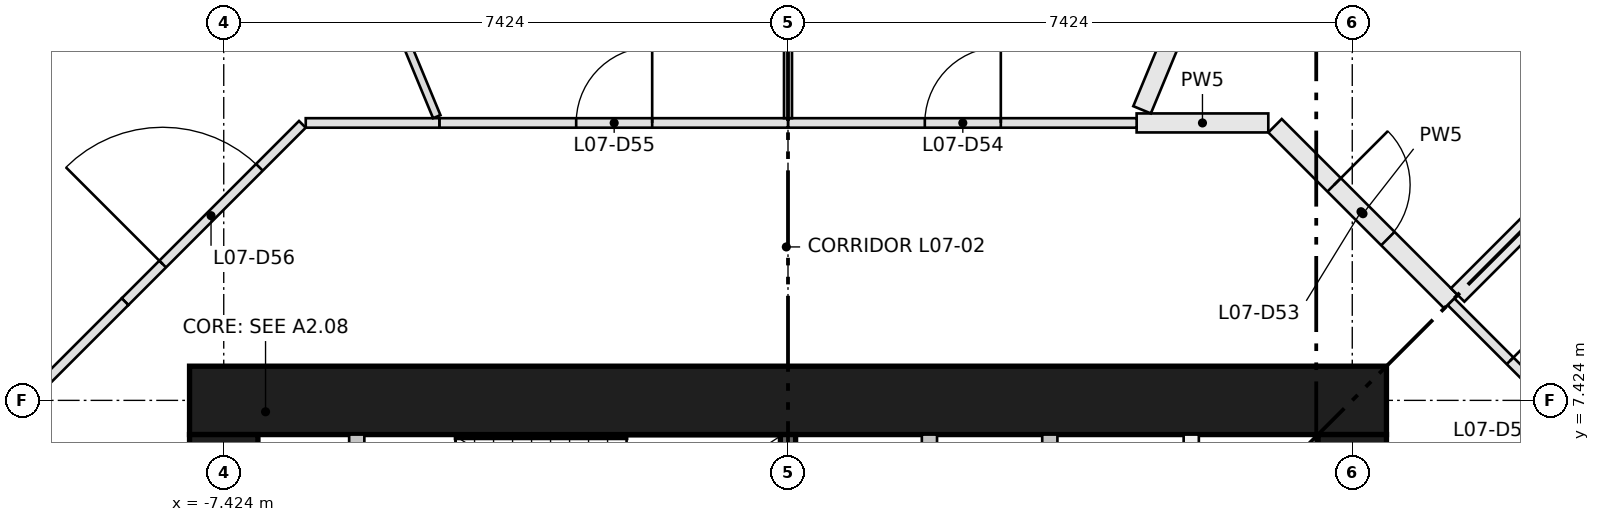
"""IFC4 building model, lengths in metres.
Left out: names, types, materials, properties, quantities, classifications, styles, units other than length and angle.
Written with IfcOpenShell. Run it as: python <this file> out.ifc"""

import sys

from ifc_helpers import new_model, si_unit, direction, frame, frame_2d, origin, place, context, subcontext, project, spatial, rectangle, extrude, element, fill, save


model = new_model("IFC4")
c1 = context("Model", 3, precision=1e-05, world=origin(), true_north=direction((0.0, 1.0)))
c2 = subcontext(c1, "Body", "Model", "MODEL_VIEW")
j1 = project(units=[si_unit("LENGTHUNIT", "METRE"), si_unit("PLANEANGLEUNIT", "RADIAN")], contexts=[c1])
p1 = place(None, origin())
s1 = spatial("IfcSite", under=j1, at=p1, CompositionType="ELEMENT")
p2 = place(p1, origin())
s2 = spatial("IfcBuilding", under=s1, at=p2, CompositionType="ELEMENT")
p3 = place(p2, frame((0.0, 0.0, 29.85)))
s3 = spatial("IfcBuildingStorey", under=s2, at=p3, CompositionType="ELEMENT", Elevation=29.85)
p4 = place(p3, frame((-7.874, 7.424, 0.0), z_axis=(0.0, 0.0, 1.0), x_axis=(1.0, 0.0, 0.0)))
e1 = element("IfcWall", 1, at=p4, inside=s3, PredefinedType="SHEAR", context=c2, shape_type="SweptSolid", body=[
    extrude(rectangle(XDim=15.748, YDim=0.9, at=frame_2d((7.874, 0.0))), origin(), (0.0, 0.0, 1.0), 3.65),
])
p5 = place(p3, frame((-7.424, -6.974, 0.0), z_axis=(0.0, 0.0, 1.0), x_axis=(0.0, 1.0, 0.0)))
e2 = element("IfcWall", 2, at=p5, inside=s3, PredefinedType="SHEAR", context=c2, shape_type="SweptSolid", body=[
    extrude(rectangle(XDim=13.948, YDim=0.9, at=frame_2d((6.974, 0.0))), origin(), (0.0, 0.0, 1.0), 3.65),
])
p6 = place(p5, frame((6.474, 0.0, 0.0)))
e3 = element("IfcOpeningElement", 3, at=p6, cuts=e2, PredefinedType="OPENING", context=c2, shape_type="SweptSolid", body=[
    extrude(rectangle(XDim=1.0, YDim=2.1, at=frame_2d((0.5, 1.05))), frame((0.0, 0.46, 0.0), z_axis=(0.0, -1.0, 0.0), x_axis=(1.0, 0.0, 0.0)), (0.0, 0.0, 1.0), 0.92),
])
p7 = place(p5, frame((3.35, 0.0, 0.0)))
e4 = element("IfcOpeningElement", 4, at=p7, cuts=e2, PredefinedType="OPENING", context=c2, shape_type="SweptSolid", body=[
    extrude(rectangle(XDim=1.8, YDim=2.1, at=frame_2d((0.9, 1.05))), frame((0.0, 0.46, 0.0), z_axis=(0.0, -1.0, 0.0), x_axis=(1.0, 0.0, 0.0)), (0.0, 0.0, 1.0), 0.92),
])
p8 = place(p5, frame((8.799, 0.0, 0.0)))
e5 = element("IfcOpeningElement", 5, at=p8, cuts=e2, PredefinedType="OPENING", context=c2, shape_type="SweptSolid", body=[
    extrude(rectangle(XDim=1.8, YDim=2.1, at=frame_2d((0.9, 1.05))), frame((0.0, 0.46, 0.0), z_axis=(0.0, -1.0, 0.0), x_axis=(1.0, 0.0, 0.0)), (0.0, 0.0, 1.0), 0.92),
])
p9 = place(p5, frame((11.974, 0.0, 0.0)))
e6 = element("IfcOpeningElement", 6, at=p9, cuts=e2, PredefinedType="OPENING", context=c2, shape_type="SweptSolid", body=[
    extrude(rectangle(XDim=1.0, YDim=2.1, at=frame_2d((0.5, 1.05))), frame((0.0, 0.46, 0.0), z_axis=(0.0, -1.0, 0.0), x_axis=(1.0, 0.0, 0.0)), (0.0, 0.0, 1.0), 0.92),
])
p10 = place(p3, frame((7.424, -6.974, 0.0), z_axis=(0.0, 0.0, 1.0), x_axis=(0.0, 1.0, 0.0)))
e7 = element("IfcWall", 7, at=p10, inside=s3, PredefinedType="SHEAR", context=c2, shape_type="SweptSolid", body=[
    extrude(rectangle(XDim=13.948, YDim=0.9, at=frame_2d((6.974, 0.0))), origin(), (0.0, 0.0, 1.0), 3.65),
])
p11 = place(p10, frame((6.474, 0.0, 0.0)))
e8 = element("IfcOpeningElement", 8, at=p11, cuts=e7, PredefinedType="OPENING", context=c2, shape_type="SweptSolid", body=[
    extrude(rectangle(XDim=1.0, YDim=2.1, at=frame_2d((0.5, 1.05))), frame((0.0, 0.46, 0.0), z_axis=(0.0, -1.0, 0.0), x_axis=(1.0, 0.0, 0.0)), (0.0, 0.0, 1.0), 0.92),
])
p12 = place(p10, frame((3.35, 0.0, 0.0)))
e9 = element("IfcOpeningElement", 9, at=p12, cuts=e7, PredefinedType="OPENING", context=c2, shape_type="SweptSolid", body=[
    extrude(rectangle(XDim=1.8, YDim=2.1, at=frame_2d((0.9, 1.05))), frame((0.0, 0.46, 0.0), z_axis=(0.0, -1.0, 0.0), x_axis=(1.0, 0.0, 0.0)), (0.0, 0.0, 1.0), 0.92),
])
p13 = place(p10, frame((8.799, 0.0, 0.0)))
e10 = element("IfcOpeningElement", 10, at=p13, cuts=e7, PredefinedType="OPENING", context=c2, shape_type="SweptSolid", body=[
    extrude(rectangle(XDim=1.8, YDim=2.1, at=frame_2d((0.9, 1.05))), frame((0.0, 0.46, 0.0), z_axis=(0.0, -1.0, 0.0), x_axis=(1.0, 0.0, 0.0)), (0.0, 0.0, 1.0), 0.92),
])
p14 = place(p3, frame((0.0, 5.574, 0.0), z_axis=(0.0, 0.0, 1.0), x_axis=(0.0, 1.0, 0.0)))
e11 = element("IfcWall", 11, at=p14, inside=s3, PredefinedType="SHEAR", context=c2, shape_type="SweptSolid", body=[
    extrude(rectangle(XDim=1.4, YDim=0.2, at=frame_2d((0.7, 0.0))), origin(), (0.0, 0.0, 1.0), 3.3),
])
for number, where, z_axis, x_axis in (
    (12, (1.861, 4.174, 0.0), (0.0, 0.0, 1.0), (0.0, 1.0, 0.0)),
    (13, (3.445, 4.174, 0.0), (0.0, 0.0, 1.0), (0.0, 1.0, 0.0)),
    (14, (5.305, 4.174, 0.0), (0.0, 0.0, 1.0), (0.0, 1.0, 0.0)),
):
    element("IfcWall", number, at=place(p3, frame(where, z_axis=z_axis, x_axis=x_axis)), inside=s3, PredefinedType="PARTITIONING", context=c2, shape_type="SweptSolid", body=[
        extrude(rectangle(XDim=2.8, YDim=0.2, at=frame_2d((1.4, 0.0))), origin(), (0.0, 0.0, 1.0), 3.3),
    ])
p15 = place(p3, frame((-5.674, 4.174, 0.0), z_axis=(0.0, 0.0, 1.0), x_axis=(0.0, 1.0, 0.0)))
e15 = element("IfcWall", 15, at=p15, inside=s3, PredefinedType="PARTITIONING", context=c2, shape_type="SweptSolid", body=[
    extrude(rectangle(XDim=2.8, YDim=0.2, at=frame_2d((1.4, 0.0))), origin(), (0.0, 0.0, 1.0), 3.3),
])
p16 = place(p15, frame((0.125, 0.0, 0.0)))
e16 = element("IfcOpeningElement", 16, at=p16, cuts=e15, PredefinedType="OPENING", context=c2, shape_type="SweptSolid", body=[
    extrude(rectangle(XDim=0.95, YDim=2.1, at=frame_2d((0.475, 1.05))), frame((0.0, 0.11, 0.0), z_axis=(0.0, -1.0, 0.0), x_axis=(1.0, 0.0, 0.0)), (0.0, 0.0, 1.0), 0.22),
])
p17 = place(p15, frame((1.725, 0.0, 0.0)))
e17 = element("IfcOpeningElement", 17, at=p17, cuts=e15, PredefinedType="OPENING", context=c2, shape_type="SweptSolid", body=[
    extrude(rectangle(XDim=0.95, YDim=2.1, at=frame_2d((0.475, 1.05))), frame((0.0, 0.11, 0.0), z_axis=(0.0, -1.0, 0.0), x_axis=(1.0, 0.0, 0.0)), (0.0, 0.0, 1.0), 0.22),
])
p18 = place(p3, frame((8.722, 8.722, 0.0), z_axis=(0.0, 0.0, 1.0), x_axis=(0.707143776336, -0.707069784102, 0.0)))
e18 = element("IfcWall", 18, at=p18, inside=s3, PredefinedType="PARTITIONING", context=c2, shape_type="SweptSolid", body=[
    extrude(rectangle(XDim=3.3, YDim=0.125, at=frame_2d((1.65, 0.0))), origin(), (0.0, 0.0, 1.0), 3.3),
])
p19 = place(p18, frame((1.1, 0.0, 0.0)))
e19 = element("IfcOpeningElement", 19, at=p19, cuts=e18, PredefinedType="OPENING", context=c2, shape_type="SweptSolid", body=[
    extrude(rectangle(XDim=1.0, YDim=2.1, at=frame_2d((0.5, 1.05))), frame((0.0, 0.073, 0.0), z_axis=(0.0, -1.0, 0.0), x_axis=(1.0, 0.0, 0.0)), (0.0, 0.0, 1.0), 0.145),
])
p20 = place(p3, frame((4.587, 11.074, 0.0), z_axis=(0.0, 0.0, 1.0), x_axis=(1.0, 0.0, 0.0)))
e20 = element("IfcWall", 20, at=p20, inside=s3, PredefinedType="PARTITIONING", context=c2, shape_type="SweptSolid", body=[
    extrude(rectangle(XDim=1.732, YDim=0.25, at=frame_2d((0.866, 0.0))), origin(), (0.0, 0.0, 1.0), 3.3),
])
p21 = place(p3, frame((6.408, 11.037, 0.0), z_axis=(0.0, 0.0, 1.0), x_axis=(0.707069491442, -0.707144068965, 0.0)))
e21 = element("IfcWall", 21, at=p21, inside=s3, PredefinedType="PARTITIONING", context=c2, shape_type="SweptSolid", body=[
    extrude(rectangle(XDim=3.274, YDim=0.25, at=frame_2d((1.637, 0.0))), origin(), (0.0, 0.0, 1.0), 3.3),
])
p22 = place(p21, frame((1.1, 0.0, 0.0)))
e22 = element("IfcOpeningElement", 22, at=p22, cuts=e21, PredefinedType="OPENING", context=c2, shape_type="SweptSolid", body=[
    extrude(rectangle(XDim=1.0, YDim=2.1, at=frame_2d((0.5, 1.05))), frame((0.0, 0.135, 0.0), z_axis=(0.0, -1.0, 0.0), x_axis=(1.0, 0.0, 0.0)), (0.0, 0.0, 1.0), 0.27),
])
p23 = place(p3, frame((0.0, 11.074, 0.0), z_axis=(0.0, 0.0, 1.0), x_axis=(1.0, 0.0, 0.0)))
e23 = element("IfcWall", 23, at=p23, inside=s3, PredefinedType="PARTITIONING", context=c2, shape_type="SweptSolid", body=[
    extrude(rectangle(XDim=4.587, YDim=0.125, at=frame_2d((2.293, 0.0))), origin(), (0.0, 0.0, 1.0), 3.3),
])
p24 = place(p23, frame((1.8, 0.0, 0.0)))
e24 = element("IfcOpeningElement", 24, at=p24, cuts=e23, PredefinedType="OPENING", context=c2, shape_type="SweptSolid", body=[
    extrude(rectangle(XDim=1.0, YDim=2.1, at=frame_2d((0.5, 1.05))), frame((0.0, 0.073, 0.0), z_axis=(0.0, -1.0, 0.0), x_axis=(1.0, 0.0, 0.0)), (0.0, 0.0, 1.0), 0.145),
])
p25 = place(p3, frame((-4.587, 11.074, 0.0), z_axis=(0.0, 0.0, 1.0), x_axis=(1.0, 0.0, 0.0)))
e25 = element("IfcWall", 25, at=p25, inside=s3, PredefinedType="PARTITIONING", context=c2, shape_type="SweptSolid", body=[
    extrude(rectangle(XDim=4.587, YDim=0.125, at=frame_2d((2.293, 0.0))), origin(), (0.0, 0.0, 1.0), 3.3),
])
p26 = place(p25, frame((1.8, 0.0, 0.0)))
e26 = element("IfcOpeningElement", 26, at=p26, cuts=e25, PredefinedType="OPENING", context=c2, shape_type="SweptSolid", body=[
    extrude(rectangle(XDim=1.0, YDim=2.1, at=frame_2d((0.5, 1.05))), frame((0.0, 0.073, 0.0), z_axis=(0.0, -1.0, 0.0), x_axis=(1.0, 0.0, 0.0)), (0.0, 0.0, 1.0), 0.145),
])
p27 = place(p3, frame((-8.722, 8.722, 0.0), z_axis=(0.0, 0.0, 1.0), x_axis=(0.707069784102, 0.707143776336, 0.0)))
e27 = element("IfcWall", 27, at=p27, inside=s3, PredefinedType="PARTITIONING", context=c2, shape_type="SweptSolid", body=[
    extrude(rectangle(XDim=3.3, YDim=0.125, at=frame_2d((1.65, 0.0))), origin(), (0.0, 0.0, 1.0), 3.3),
])
p28 = place(p27, frame((0.7, 0.0, 0.0)))
e28 = element("IfcOpeningElement", 28, at=p28, cuts=e27, PredefinedType="OPENING", context=c2, shape_type="SweptSolid", body=[
    extrude(rectangle(XDim=1.8, YDim=2.1, at=frame_2d((0.9, 1.05))), frame((0.0, 0.073, 0.0), z_axis=(0.0, -1.0, 0.0), x_axis=(1.0, 0.0, 0.0)), (0.0, 0.0, 1.0), 0.145),
])
p29 = place(p3, frame((-6.345, 11.074, 0.0), z_axis=(0.0, 0.0, 1.0), x_axis=(1.0, 0.0, 0.0)))
e29 = element("IfcWall", 29, at=p29, inside=s3, PredefinedType="PARTITIONING", context=c2, shape_type="SweptSolid", body=[
    extrude(rectangle(XDim=1.758, YDim=0.125, at=frame_2d((0.879, 0.0))), origin(), (0.0, 0.0, 1.0), 3.3),
])
p30 = place(p3, frame((-11.056, 6.389, 0.0), z_axis=(0.0, 0.0, 1.0), x_axis=(0.707143776336, 0.707069784102, 0.0)))
e30 = element("IfcWall", 30, at=p30, inside=s3, PredefinedType="PARTITIONING", context=c2, shape_type="SweptSolid", body=[
    extrude(rectangle(XDim=3.3, YDim=0.125, at=frame_2d((1.65, 0.0))), origin(), (0.0, 0.0, 1.0), 3.3),
])
p31 = place(p3, frame((13.131, 13.131, 0.0), z_axis=(0.0, 0.0, 1.0), x_axis=(-0.707106781187, -0.707106781187, 0.0)))
e31 = element("IfcWall", 31, at=p31, inside=s3, PredefinedType="PARTITIONING", context=c2, shape_type="SweptSolid", body=[
    extrude(rectangle(XDim=6.11, YDim=0.25, at=frame_2d((3.055, 0.0))), origin(), (0.0, 0.0, 1.0), 3.3),
])
p32 = place(p3, frame((4.659, 11.247, 0.0), z_axis=(0.0, 0.0, 1.0), x_axis=(0.382693858119, 0.923875213954, 0.0)))
e32 = element("IfcWall", 32, at=p32, inside=s3, PredefinedType="PARTITIONING", context=c2, shape_type="SweptSolid", body=[
    extrude(rectangle(XDim=2.626, YDim=0.25, at=frame_2d((1.313, 0.0))), origin(), (0.0, 0.0, 1.0), 3.3),
])
p33 = place(p3, frame((0.0, 11.136, 0.0), z_axis=(0.0, 0.0, 1.0), x_axis=(0.0, 1.0, 0.0)))
e33 = element("IfcWall", 33, at=p33, inside=s3, PredefinedType="PARTITIONING", context=c2, shape_type="SweptSolid", body=[
    extrude(rectangle(XDim=3.607, YDim=0.105, at=frame_2d((1.804, 0.0))), origin(), (0.0, 0.0, 1.0), 3.3),
])
p34 = place(p3, frame((-4.621, 11.156, 0.0), z_axis=(0.0, 0.0, 1.0), x_axis=(-0.382750161953, 0.923851889388, 0.0)))
e34 = element("IfcWall", 34, at=p34, inside=s3, PredefinedType="PARTITIONING", context=c2, shape_type="SweptSolid", body=[
    extrude(rectangle(XDim=2.724, YDim=0.105, at=frame_2d((1.362, 0.0))), origin(), (0.0, 0.0, 1.0), 3.3),
])
p35 = place(p19, origin())
e35 = element("IfcDoor", 35, at=p35, inside=s3, OperationType="SINGLE_SWING_LEFT", PredefinedType="DOOR", context=c2, shape_type="SweptSolid", body=[
    extrude(rectangle(XDim=1.0, YDim=2.1, at=frame_2d((0.5, 1.05))), frame((0.0, 0.025, 0.0), z_axis=(0.0, -1.0, 0.0), x_axis=(1.0, 0.0, 0.0)), (0.0, 0.0, 1.0), 0.05),
])
fill(e19, e35)
p36 = place(p22, origin())
e36 = element("IfcDoor", 36, at=p36, inside=s3, OperationType="SINGLE_SWING_LEFT", PredefinedType="DOOR", context=c2, shape_type="SweptSolid", body=[
    extrude(rectangle(XDim=1.0, YDim=2.1, at=frame_2d((0.5, 1.05))), frame((0.0, 0.025, 0.0), z_axis=(0.0, -1.0, 0.0), x_axis=(1.0, 0.0, 0.0)), (0.0, 0.0, 1.0), 0.05),
])
fill(e22, e36)
p37 = place(p24, origin())
e37 = element("IfcDoor", 37, at=p37, inside=s3, OperationType="SINGLE_SWING_RIGHT", PredefinedType="DOOR", context=c2, shape_type="SweptSolid", body=[
    extrude(rectangle(XDim=1.0, YDim=2.1, at=frame_2d((0.5, 1.05))), frame((0.0, 0.025, 0.0), z_axis=(0.0, -1.0, 0.0), x_axis=(1.0, 0.0, 0.0)), (0.0, 0.0, 1.0), 0.05),
])
fill(e24, e37)
p38 = place(p26, origin())
e38 = element("IfcDoor", 38, at=p38, inside=s3, OperationType="SINGLE_SWING_RIGHT", PredefinedType="DOOR", context=c2, shape_type="SweptSolid", body=[
    extrude(rectangle(XDim=1.0, YDim=2.1, at=frame_2d((0.5, 1.05))), frame((0.0, 0.025, 0.0), z_axis=(0.0, -1.0, 0.0), x_axis=(1.0, 0.0, 0.0)), (0.0, 0.0, 1.0), 0.05),
])
fill(e26, e38)
p39 = place(p28, origin())
e39 = element("IfcDoor", 39, at=p39, inside=s3, OperationType="DOUBLE_DOOR_SINGLE_SWING", PredefinedType="DOOR", context=c2, shape_type="SweptSolid", body=[
    extrude(rectangle(XDim=1.8, YDim=2.1, at=frame_2d((0.9, 1.05))), frame((0.0, 0.025, 0.0), z_axis=(0.0, -1.0, 0.0), x_axis=(1.0, 0.0, 0.0)), (0.0, 0.0, 1.0), 0.05),
])
fill(e28, e39)
save(model, sys.argv[1])
